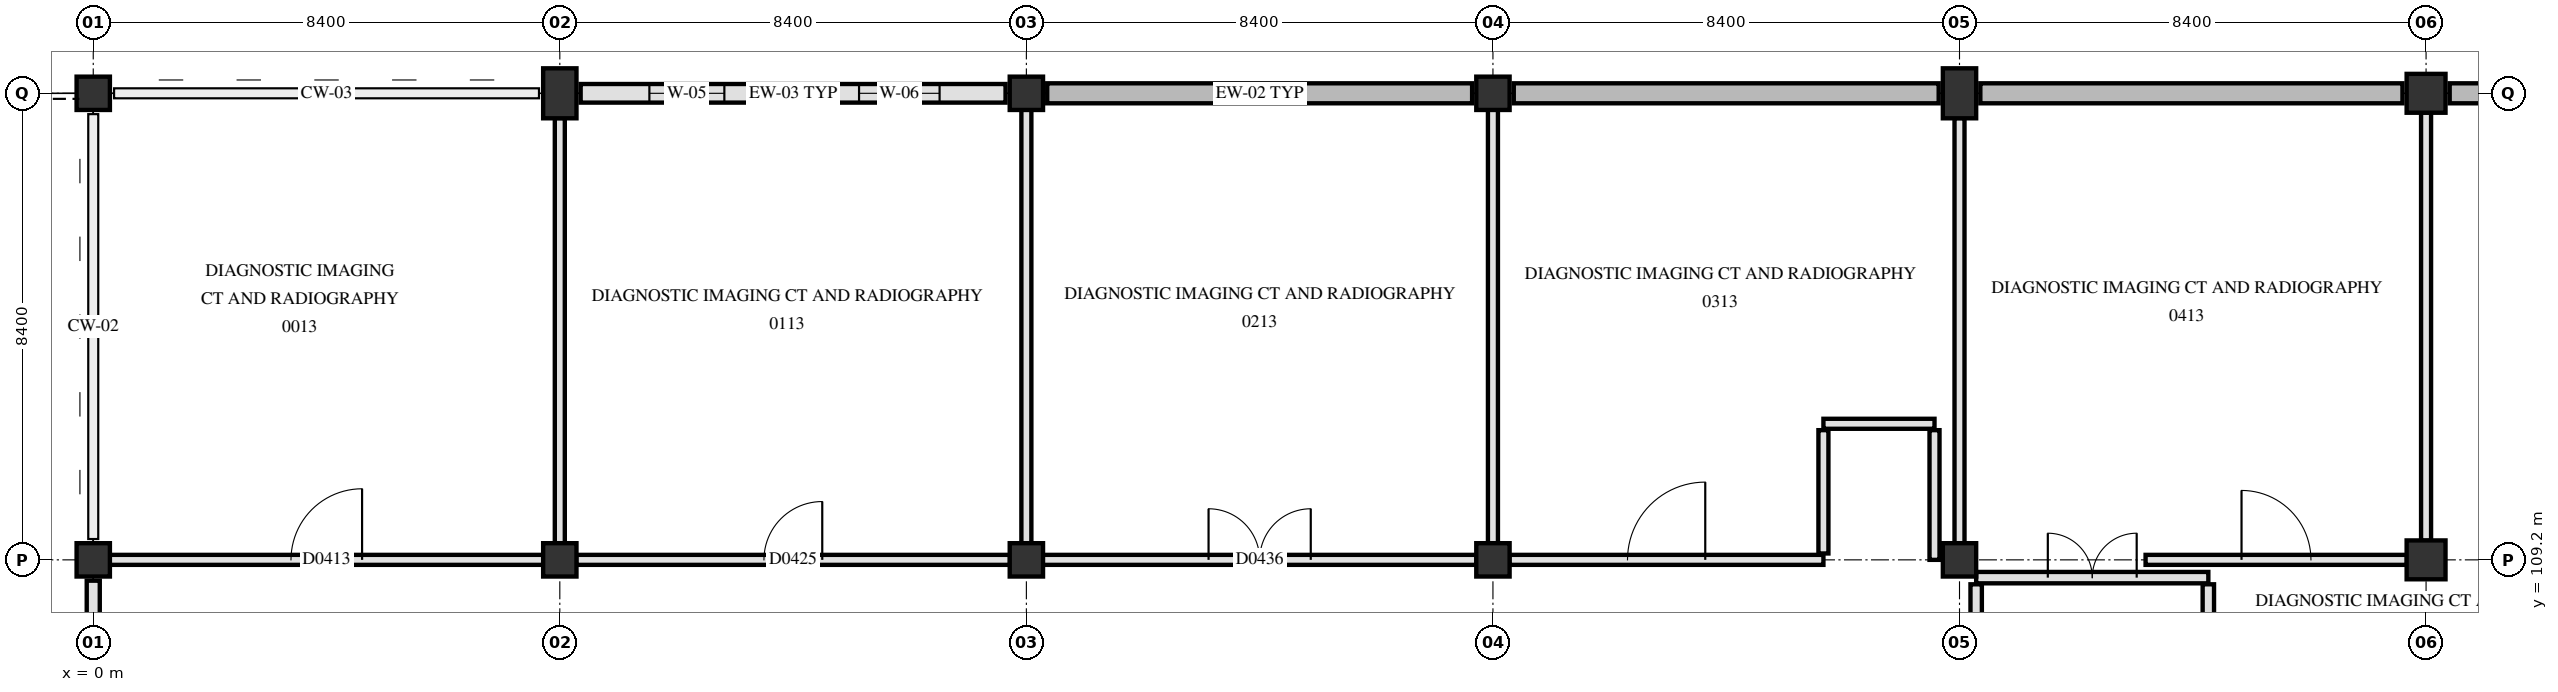
"""IFC4 building model, lengths in metres.
Left out: names, types, materials, properties, quantities, classifications, styles, units other than length and angle.
Written with IfcOpenShell. Run it as: python <this file> out.ifc"""

import sys

from ifc_helpers import new_model, si_unit, direction, frame, frame_2d, origin, origin_2d, place, context, subcontext, project, spatial, rectangle, extrude, element, fill, save


model = new_model("IFC4")
c1 = context("Model", 3, precision=1e-05, world=origin(), true_north=direction((0.0, 1.0)))
c2 = subcontext(c1, "Body", "Model", "MODEL_VIEW")
j1 = project(units=[si_unit("LENGTHUNIT", "METRE"), si_unit("PLANEANGLEUNIT", "RADIAN")], contexts=[c1])
p1 = place(None, origin())
s1 = spatial("IfcSite", under=j1, at=p1, CompositionType="ELEMENT")
p2 = place(p1, origin())
s2 = spatial("IfcBuilding", under=s1, at=p2, CompositionType="ELEMENT")
p3 = place(p2, origin())
s3 = spatial("IfcBuildingStorey", under=s2, at=p3, CompositionType="ELEMENT", Elevation=0.0)
for number, where, z_axis, x_axis in (
    (1, (0.0, 109.2, 0.0), (0.0, 0.0, 1.0), (1.0, 0.0, 0.0)),
    (2, (0.0, 117.6, 0.0), (0.0, 0.0, 1.0), (1.0, 0.0, 0.0)),
    (3, (8.4, 109.2, 0.0), (0.0, 0.0, 1.0), (1.0, 0.0, 0.0)),
):
    element("IfcColumn", number, at=place(p3, frame(where, z_axis=z_axis, x_axis=x_axis)), inside=s3, PredefinedType="COLUMN", context=c2, shape_type="SweptSolid", body=[
        extrude(rectangle(XDim=0.6, YDim=0.6, at=origin_2d()), origin(), (0.0, 0.0, 1.0), 4.8),
    ])
p4 = place(p3, frame((8.4, 117.6, 0.0), z_axis=(0.0, 0.0, 1.0), x_axis=(1.0, 0.0, 0.0)))
e4 = element("IfcColumn", 4, at=p4, inside=s3, PredefinedType="PILASTER", context=c2, shape_type="SweptSolid", body=[
    extrude(rectangle(XDim=0.6, YDim=0.9, at=origin_2d()), origin(), (0.0, 0.0, 1.0), 4.8),
])
for number, where, z_axis, x_axis in (
    (5, (16.8, 109.2, 0.0), (0.0, 0.0, 1.0), (1.0, 0.0, 0.0)),
    (6, (16.8, 117.6, 0.0), (0.0, 0.0, 1.0), (1.0, 0.0, 0.0)),
    (7, (25.2, 109.2, 0.0), (0.0, 0.0, 1.0), (1.0, 0.0, 0.0)),
    (8, (25.2, 117.6, 0.0), (0.0, 0.0, 1.0), (1.0, 0.0, 0.0)),
    (9, (33.6, 109.2, 0.0), (0.0, 0.0, 1.0), (1.0, 0.0, 0.0)),
):
    element("IfcColumn", number, at=place(p3, frame(where, z_axis=z_axis, x_axis=x_axis)), inside=s3, PredefinedType="COLUMN", context=c2, shape_type="SweptSolid", body=[
        extrude(rectangle(XDim=0.6, YDim=0.6, at=origin_2d()), origin(), (0.0, 0.0, 1.0), 4.8),
    ])
p5 = place(p3, frame((33.6, 117.6, 0.0), z_axis=(0.0, 0.0, 1.0), x_axis=(1.0, 0.0, 0.0)))
e10 = element("IfcColumn", 10, at=p5, inside=s3, PredefinedType="PILASTER", context=c2, shape_type="SweptSolid", body=[
    extrude(rectangle(XDim=0.6, YDim=0.9, at=origin_2d()), origin(), (0.0, 0.0, 1.0), 4.8),
])
for number, where, z_axis, x_axis in (
    (11, (42.0, 109.2, 0.0), (0.0, 0.0, 1.0), (1.0, 0.0, 0.0)),
    (12, (42.0, 117.6, 0.0), (0.0, 0.0, 1.0), (1.0, 0.0, 0.0)),
):
    element("IfcColumn", number, at=place(p3, frame(where, z_axis=z_axis, x_axis=x_axis)), inside=s3, PredefinedType="COLUMN", context=c2, shape_type="SweptSolid", body=[
        extrude(rectangle(XDim=0.7, YDim=0.7, at=origin_2d()), origin(), (0.0, 0.0, 1.0), 4.8),
    ])
p6 = place(p3, frame((0.0, 101.175, 0.0), z_axis=(0.0, 0.0, 1.0), x_axis=(0.0, 1.0, 0.0)))
e13 = element("IfcWall", 13, at=p6, inside=s3, PredefinedType="SOLIDWALL", context=c2, shape_type="SweptSolid", body=[
    extrude(rectangle(XDim=7.65, YDim=0.235, at=frame_2d((3.825, 0.0))), origin(), (0.0, 0.0, 1.0), 3.79),
])
p7 = place(p6, frame((1.337, 0.0, 0.85)))
e14 = element("IfcOpeningElement", 14, at=p7, cuts=e13, PredefinedType="OPENING", context=c2, shape_type="SweptSolid", body=[
    extrude(rectangle(XDim=1.15, YDim=1.3, at=frame_2d((0.575, 0.65))), frame((0.0, 0.127, 0.0), z_axis=(0.0, -1.0, 0.0), x_axis=(1.0, 0.0, 0.0)), (0.0, 0.0, 1.0), 0.255),
])
p8 = place(p6, frame((5.113, 0.0, 0.85)))
e15 = element("IfcOpeningElement", 15, at=p8, cuts=e13, PredefinedType="OPENING", context=c2, shape_type="SweptSolid", body=[
    extrude(rectangle(XDim=1.25, YDim=1.3, at=frame_2d((0.625, 0.65))), frame((0.0, 0.127, 0.0), z_axis=(0.0, -1.0, 0.0), x_axis=(1.0, 0.0, 0.0)), (0.0, 0.0, 1.0), 0.255),
])
p9 = place(p3, frame((8.775, 117.6, 0.0), z_axis=(0.0, 0.0, 1.0), x_axis=(1.0, 0.0, 0.0)))
e16 = element("IfcWall", 16, at=p9, inside=s3, PredefinedType="SOLIDWALL", context=c2, shape_type="SweptSolid", body=[
    extrude(rectangle(XDim=7.65, YDim=0.335, at=frame_2d((3.825, 0.0))), origin(), (0.0, 0.0, 1.0), 3.79),
])
p10 = place(p9, frame((1.238, 0.0, 0.85)))
e17 = element("IfcOpeningElement", 17, at=p10, cuts=e16, PredefinedType="OPENING", context=c2, shape_type="SweptSolid", body=[
    extrude(rectangle(XDim=1.35, YDim=1.3, at=frame_2d((0.675, 0.65))), frame((0.0, 0.177, 0.0), z_axis=(0.0, -1.0, 0.0), x_axis=(1.0, 0.0, 0.0)), (0.0, 0.0, 1.0), 0.355),
])
p11 = place(p9, frame((5.012, 0.0, 0.85)))
e18 = element("IfcOpeningElement", 18, at=p11, cuts=e16, PredefinedType="OPENING", context=c2, shape_type="SweptSolid", body=[
    extrude(rectangle(XDim=1.45, YDim=1.3, at=frame_2d((0.725, 0.65))), frame((0.0, 0.177, 0.0), z_axis=(0.0, -1.0, 0.0), x_axis=(1.0, 0.0, 0.0)), (0.0, 0.0, 1.0), 0.355),
])
p12 = place(p3, frame((17.175, 117.6, 0.0), z_axis=(0.0, 0.0, 1.0), x_axis=(1.0, 0.0, 0.0)))
e19 = element("IfcWall", 19, at=p12, inside=s3, PredefinedType="SOLIDWALL", context=c2, shape_type="SweptSolid", body=[
    extrude(rectangle(XDim=7.65, YDim=0.36, at=frame_2d((3.825, 0.0))), origin(), (0.0, 0.0, 1.0), 4.5),
])
p13 = place(p3, frame((25.575, 117.6, 0.0), z_axis=(0.0, 0.0, 1.0), x_axis=(1.0, 0.0, 0.0)))
e20 = element("IfcWall", 20, at=p13, inside=s3, PredefinedType="SOLIDWALL", context=c2, shape_type="SweptSolid", body=[
    extrude(rectangle(XDim=7.65, YDim=0.36, at=frame_2d((3.825, 0.0))), origin(), (0.0, 0.0, 1.0), 4.5),
])
p14 = place(p3, frame((33.975, 117.6, 0.0), z_axis=(0.0, 0.0, 1.0), x_axis=(1.0, 0.0, 0.0)))
e21 = element("IfcWall", 21, at=p14, inside=s3, PredefinedType="SOLIDWALL", context=c2, shape_type="SweptSolid", body=[
    extrude(rectangle(XDim=7.6, YDim=0.36, at=frame_2d((3.8, 0.0))), origin(), (0.0, 0.0, 1.0), 4.5),
])
p15 = place(p3, frame((42.425, 117.6, 0.0), z_axis=(0.0, 0.0, 1.0), x_axis=(1.0, 0.0, 0.0)))
e22 = element("IfcWall", 22, at=p15, inside=s3, PredefinedType="SOLIDWALL", context=c2, shape_type="SweptSolid", body=[
    extrude(rectangle(XDim=7.55, YDim=0.36, at=frame_2d((3.775, 0.0))), origin(), (0.0, 0.0, 1.0), 4.5),
])
p16 = place(p3, frame((38.08, 104.64, 0.0), z_axis=(0.0, 0.0, 1.0), x_axis=(0.0, 1.0, 0.0)))
e23 = element("IfcWall", 23, at=p16, inside=s3, PredefinedType="PARTITIONING", context=c2, shape_type="SweptSolid", body=[
    extrude(rectangle(XDim=4.12, YDim=0.205, at=frame_2d((2.06, 0.0))), origin(), (0.0, 0.0, 1.0), 4.49),
])
p17 = place(p3, frame((33.9, 104.64, 0.0), z_axis=(0.0, 0.0, 1.0), x_axis=(0.0, 1.0, 0.0)))
e24 = element("IfcWall", 24, at=p17, inside=s3, PredefinedType="PARTITIONING", context=c2, shape_type="SweptSolid", body=[
    extrude(rectangle(XDim=4.12, YDim=0.205, at=frame_2d((2.06, 0.0))), origin(), (0.0, 0.0, 1.0), 3.89),
])
p18 = place(p3, frame((33.9, 108.88, 0.0), z_axis=(0.0, 0.0, 1.0), x_axis=(1.0, 0.0, 0.0)))
e25 = element("IfcWall", 25, at=p18, inside=s3, PredefinedType="PARTITIONING", context=c2, shape_type="SweptSolid", body=[
    extrude(rectangle(XDim=4.18, YDim=0.205, at=frame_2d((2.09, 0.0))), origin(), (0.0, 0.0, 1.0), 3.84),
])
p19 = place(p18, frame((1.29, 0.0, 0.0)))
e26 = element("IfcOpeningElement", 26, at=p19, cuts=e25, PredefinedType="OPENING", context=c2, shape_type="SweptSolid", body=[
    extrude(rectangle(XDim=1.6, YDim=2.25, at=frame_2d((0.8, 1.125))), frame((0.0, 0.113, 0.0), z_axis=(0.0, -1.0, 0.0), x_axis=(1.0, 0.0, 0.0)), (0.0, 0.0, 1.0), 0.225),
])
p20 = place(p3, frame((0.295, 109.2, 0.0), z_axis=(0.0, 0.0, 1.0), x_axis=(1.0, 0.0, 0.0)))
e27 = element("IfcWall", 27, at=p20, inside=s3, PredefinedType="PARTITIONING", context=c2, shape_type="SweptSolid", body=[
    extrude(rectangle(XDim=7.81, YDim=0.18, at=frame_2d((3.905, 0.0))), origin(), (0.0, 0.0, 1.0), 3.84),
])
p21 = place(p20, frame((3.265, 0.0, 0.0)))
e28 = element("IfcOpeningElement", 28, at=p21, cuts=e27, PredefinedType="OPENING", context=c2, shape_type="SweptSolid", body=[
    extrude(rectangle(XDim=1.28, YDim=2.18, at=frame_2d((0.64, 1.09))), frame((0.0, 0.1, 0.0), z_axis=(0.0, -1.0, 0.0), x_axis=(1.0, 0.0, 0.0)), (0.0, 0.0, 1.0), 0.2),
])
p22 = place(p3, frame((8.695, 109.2, 0.0), z_axis=(0.0, 0.0, 1.0), x_axis=(1.0, 0.0, 0.0)))
e29 = element("IfcWall", 29, at=p22, inside=s3, PredefinedType="PARTITIONING", context=c2, shape_type="SweptSolid", body=[
    extrude(rectangle(XDim=7.81, YDim=0.18, at=frame_2d((3.905, 0.0))), origin(), (0.0, 0.0, 1.0), 3.84),
])
p23 = place(p22, frame((3.38, 0.0, 0.0)))
e30 = element("IfcOpeningElement", 30, at=p23, cuts=e29, PredefinedType="OPENING", context=c2, shape_type="SweptSolid", body=[
    extrude(rectangle(XDim=1.05, YDim=2.15, at=frame_2d((0.525, 1.075))), frame((0.0, 0.1, 0.0), z_axis=(0.0, -1.0, 0.0), x_axis=(1.0, 0.0, 0.0)), (0.0, 0.0, 1.0), 0.2),
])
p24 = place(p3, frame((17.095, 109.2, 0.0), z_axis=(0.0, 0.0, 1.0), x_axis=(1.0, 0.0, 0.0)))
e31 = element("IfcWall", 31, at=p24, inside=s3, PredefinedType="PARTITIONING", context=c2, shape_type="SweptSolid", body=[
    extrude(rectangle(XDim=7.81, YDim=0.18, at=frame_2d((3.905, 0.0))), origin(), (0.0, 0.0, 1.0), 3.84),
])
p25 = place(p24, frame((2.985, 0.0, 0.0)))
e32 = element("IfcOpeningElement", 32, at=p25, cuts=e31, PredefinedType="OPENING", context=c2, shape_type="SweptSolid", body=[
    extrude(rectangle(XDim=1.84, YDim=2.28, at=frame_2d((0.92, 1.14))), frame((0.0, 0.1, 0.0), z_axis=(0.0, -1.0, 0.0), x_axis=(1.0, 0.0, 0.0)), (0.0, 0.0, 1.0), 0.2),
])
p26 = place(p3, frame((25.495, 109.2, 0.0), z_axis=(0.0, 0.0, 1.0), x_axis=(1.0, 0.0, 0.0)))
e33 = element("IfcWall", 33, at=p26, inside=s3, PredefinedType="PARTITIONING", context=c2, shape_type="SweptSolid", body=[
    extrude(rectangle(XDim=5.655, YDim=0.18, at=frame_2d((2.827, 0.0))), origin(), (0.0, 0.0, 1.0), 3.84),
])
p27 = place(p26, frame((2.127, 0.0, 0.0)))
e34 = element("IfcOpeningElement", 34, at=p27, cuts=e33, PredefinedType="OPENING", context=c2, shape_type="SweptSolid", body=[
    extrude(rectangle(XDim=1.4, YDim=2.2, at=frame_2d((0.7, 1.1))), frame((0.0, 0.1, 0.0), z_axis=(0.0, -1.0, 0.0), x_axis=(1.0, 0.0, 0.0)), (0.0, 0.0, 1.0), 0.2),
])
p28 = place(p3, frame((36.95, 109.2, 0.0), z_axis=(0.0, 0.0, 1.0), x_axis=(1.0, 0.0, 0.0)))
e35 = element("IfcWall", 35, at=p28, inside=s3, PredefinedType="PARTITIONING", context=c2, shape_type="SweptSolid", body=[
    extrude(rectangle(XDim=4.705, YDim=0.18, at=frame_2d((2.353, 0.0))), origin(), (0.0, 0.0, 1.0), 3.84),
])
p29 = place(p28, frame((1.728, 0.0, 0.0)))
e36 = element("IfcOpeningElement", 36, at=p29, cuts=e35, PredefinedType="OPENING", context=c2, shape_type="SweptSolid", body=[
    extrude(rectangle(XDim=1.25, YDim=2.2, at=frame_2d((0.625, 1.1))), frame((0.0, 0.1, 0.0), z_axis=(0.0, -1.0, 0.0), x_axis=(1.0, 0.0, 0.0)), (0.0, 0.0, 1.0), 0.2),
])
p30 = place(p3, frame((31.15, 111.65, 0.0), z_axis=(0.0, 0.0, 1.0), x_axis=(1.0, 0.0, 0.0)))
e37 = element("IfcWall", 37, at=p30, inside=s3, PredefinedType="PARTITIONING", context=c2, shape_type="SweptSolid", body=[
    extrude(rectangle(XDim=2.0, YDim=0.18, at=frame_2d((1.0, 0.0))), origin(), (0.0, 0.0, 1.0), 4.49),
])
p31 = place(p3, frame((8.4, 109.495, 0.0), z_axis=(0.0, 0.0, 1.0), x_axis=(0.0, 1.0, 0.0)))
e38 = element("IfcWall", 38, at=p31, inside=s3, PredefinedType="PARTITIONING", context=c2, shape_type="SweptSolid", body=[
    extrude(rectangle(XDim=7.66, YDim=0.18, at=frame_2d((3.83, 0.0))), origin(), (0.0, 0.0, 1.0), 3.89),
])
for number, where, z_axis, x_axis in (
    (39, (16.8, 109.495, 0.0), (0.0, 0.0, 1.0), (0.0, 1.0, 0.0)),
    (40, (25.2, 109.495, 0.0), (0.0, 0.0, 1.0), (0.0, 1.0, 0.0)),
):
    element("IfcWall", number, at=place(p3, frame(where, z_axis=z_axis, x_axis=x_axis)), inside=s3, PredefinedType="PARTITIONING", context=c2, shape_type="SweptSolid", body=[
        extrude(rectangle(XDim=7.81, YDim=0.18, at=frame_2d((3.905, 0.0))), origin(), (0.0, 0.0, 1.0), 3.89),
    ])
p32 = place(p3, frame((31.15, 109.315, 0.0), z_axis=(0.0, 0.0, 1.0), x_axis=(0.0, 1.0, 0.0)))
e41 = element("IfcWall", 41, at=p32, inside=s3, PredefinedType="PARTITIONING", context=c2, shape_type="SweptSolid", body=[
    extrude(rectangle(XDim=2.22, YDim=0.18, at=frame_2d((1.11, 0.0))), origin(), (0.0, 0.0, 1.0), 3.84),
])
p33 = place(p3, frame((33.15, 109.2, 0.0), z_axis=(0.0, 0.0, 1.0), x_axis=(0.0, 1.0, 0.0)))
e42 = element("IfcWall", 42, at=p33, inside=s3, PredefinedType="PARTITIONING", context=c2, shape_type="SweptSolid", body=[
    extrude(rectangle(XDim=2.335, YDim=0.18, at=frame_2d((1.167, 0.0))), origin(), (0.0, 0.0, 1.0), 3.84),
])
p34 = place(p3, frame((33.6, 109.495, 0.0), z_axis=(0.0, 0.0, 1.0), x_axis=(0.0, 1.0, 0.0)))
e43 = element("IfcWall", 43, at=p34, inside=s3, PredefinedType="PARTITIONING", context=c2, shape_type="SweptSolid", body=[
    extrude(rectangle(XDim=7.66, YDim=0.18, at=frame_2d((3.83, 0.0))), origin(), (0.0, 0.0, 1.0), 3.89),
])
p35 = place(p3, frame((42.0, 109.545, 0.0), z_axis=(0.0, 0.0, 1.0), x_axis=(0.0, 1.0, 0.0)))
e44 = element("IfcWall", 44, at=p35, inside=s3, PredefinedType="PARTITIONING", context=c2, shape_type="SweptSolid", body=[
    extrude(rectangle(XDim=7.71, YDim=0.18, at=frame_2d((3.855, 0.0))), origin(), (0.0, 0.0, 1.0), 3.89),
])
p36 = place(p10, origin())
e45 = element("IfcWindow", 45, at=p36, inside=s3, PartitioningType="SINGLE_PANEL", PredefinedType="WINDOW", context=c2, shape_type="SweptSolid", body=[
    extrude(rectangle(XDim=1.35, YDim=1.3, at=frame_2d((0.675, 0.65))), frame((0.0, 0.03, 0.0), z_axis=(0.0, -1.0, 0.0), x_axis=(1.0, 0.0, 0.0)), (0.0, 0.0, 1.0), 0.06),
])
fill(e17, e45)
p37 = place(p11, origin())
e46 = element("IfcWindow", 46, at=p37, inside=s3, PartitioningType="SINGLE_PANEL", PredefinedType="WINDOW", context=c2, shape_type="SweptSolid", body=[
    extrude(rectangle(XDim=1.45, YDim=1.3, at=frame_2d((0.725, 0.65))), frame((0.0, 0.03, 0.0), z_axis=(0.0, -1.0, 0.0), x_axis=(1.0, 0.0, 0.0)), (0.0, 0.0, 1.0), 0.06),
])
fill(e18, e46)
p38 = place(p19, origin())
e47 = element("IfcDoor", 47, at=p38, inside=s3, OperationType="DOUBLE_SWING_LEFT", PredefinedType="DOOR", context=c2, shape_type="SweptSolid", body=[
    extrude(rectangle(XDim=1.6, YDim=2.25, at=frame_2d((0.8, 1.125))), frame((0.0, 0.025, 0.0), z_axis=(0.0, -1.0, 0.0), x_axis=(1.0, 0.0, 0.0)), (0.0, 0.0, 1.0), 0.05),
])
fill(e26, e47)
p39 = place(p21, origin())
e48 = element("IfcDoor", 48, at=p39, inside=s3, OperationType="SINGLE_SWING_RIGHT", PredefinedType="DOOR", context=c2, shape_type="SweptSolid", body=[
    extrude(rectangle(XDim=1.28, YDim=2.18, at=frame_2d((0.64, 1.09))), frame((0.0, 0.025, 0.0), z_axis=(0.0, -1.0, 0.0), x_axis=(1.0, 0.0, 0.0)), (0.0, 0.0, 1.0), 0.05),
])
fill(e28, e48)
p40 = place(p23, origin())
e49 = element("IfcDoor", 49, at=p40, inside=s3, OperationType="SINGLE_SWING_RIGHT", PredefinedType="DOOR", context=c2, shape_type="SweptSolid", body=[
    extrude(rectangle(XDim=1.05, YDim=2.15, at=frame_2d((0.525, 1.075))), frame((0.0, 0.025, 0.0), z_axis=(0.0, -1.0, 0.0), x_axis=(1.0, 0.0, 0.0)), (0.0, 0.0, 1.0), 0.05),
])
fill(e30, e49)
p41 = place(p25, origin())
e50 = element("IfcDoor", 50, at=p41, inside=s3, OperationType="DOUBLE_SWING_LEFT", PredefinedType="DOOR", context=c2, shape_type="SweptSolid", body=[
    extrude(rectangle(XDim=1.84, YDim=2.28, at=frame_2d((0.92, 1.14))), frame((0.0, 0.025, 0.0), z_axis=(0.0, -1.0, 0.0), x_axis=(1.0, 0.0, 0.0)), (0.0, 0.0, 1.0), 0.05),
])
fill(e32, e50)
p42 = place(p27, origin())
e51 = element("IfcDoor", 51, at=p42, inside=s3, OperationType="SINGLE_SWING_RIGHT", PredefinedType="DOOR", context=c2, shape_type="SweptSolid", body=[
    extrude(rectangle(XDim=1.4, YDim=2.2, at=frame_2d((0.7, 1.1))), frame((0.0, 0.025, 0.0), z_axis=(0.0, -1.0, 0.0), x_axis=(1.0, 0.0, 0.0)), (0.0, 0.0, 1.0), 0.05),
])
fill(e34, e51)
p43 = place(p29, origin())
e52 = element("IfcDoor", 52, at=p43, inside=s3, OperationType="SINGLE_SWING_LEFT", PredefinedType="DOOR", context=c2, shape_type="SweptSolid", body=[
    extrude(rectangle(XDim=1.25, YDim=2.2, at=frame_2d((0.625, 1.1))), frame((0.0, 0.025, 0.0), z_axis=(0.0, -1.0, 0.0), x_axis=(1.0, 0.0, 0.0)), (0.0, 0.0, 1.0), 0.05),
])
fill(e36, e52)
save(model, sys.argv[1])
